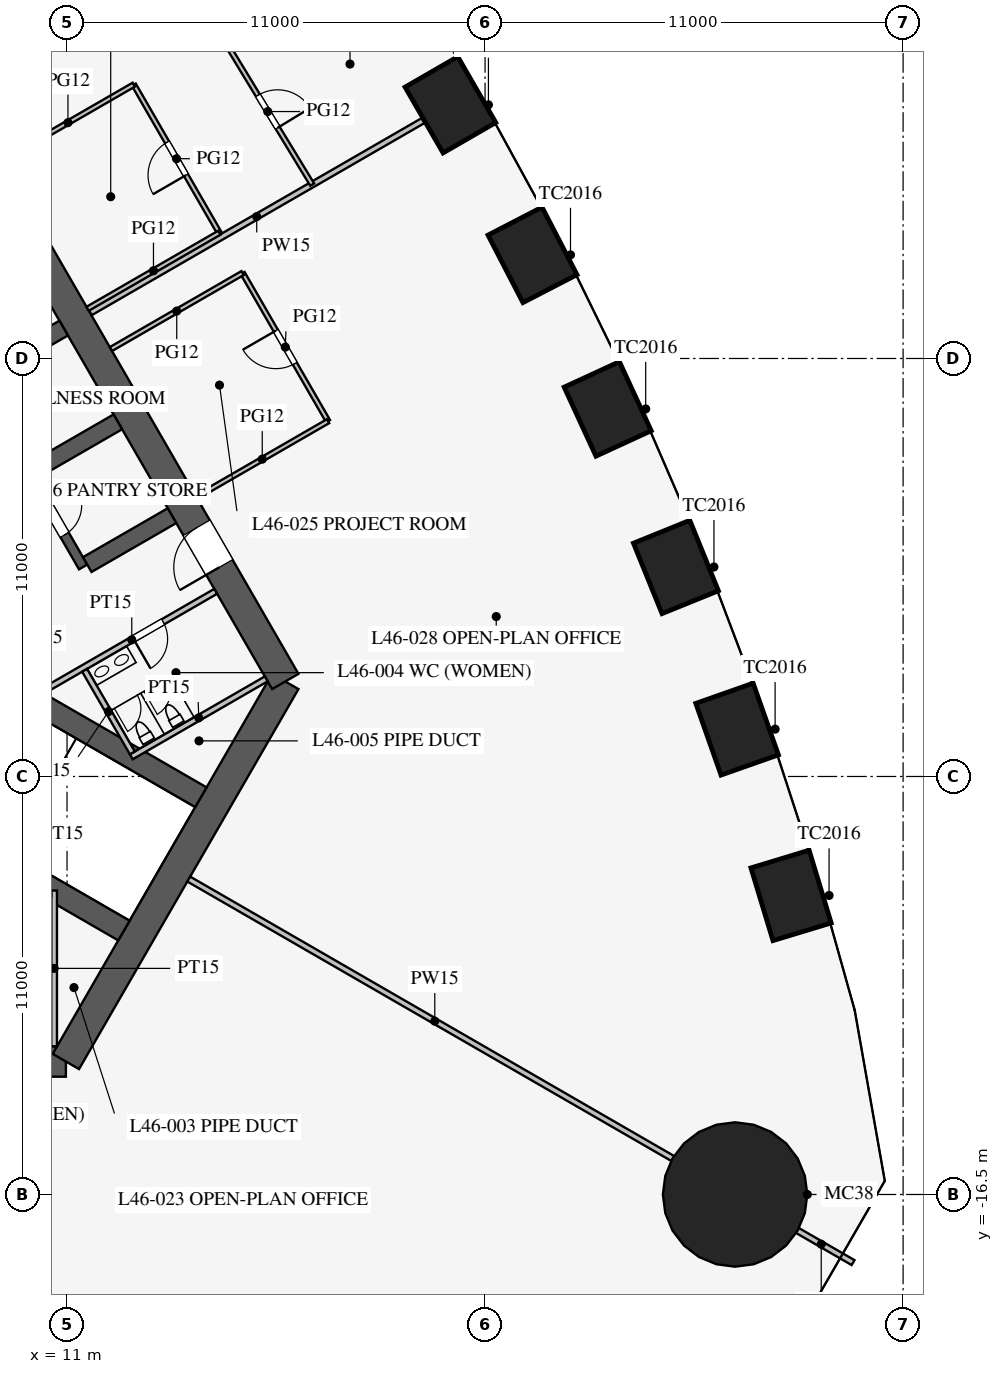
"""IFC4 building model, lengths in metres.
Left out: names, types, materials, properties, quantities, classifications, styles, units other than length and angle.
Written with IfcOpenShell. Run it as: python <this file> out.ifc"""

import sys

from ifc_helpers import new_model, si_unit, direction, frame, frame_2d, origin, origin_2d, place, context, subcontext, project, spatial, rectangle, circle, extrude, element, fill, save


model = new_model("IFC4")
c1 = context("Model", 3, precision=1e-05, world=origin(), true_north=direction((0.0, 1.0)))
c2 = subcontext(c1, "Body", "Model", "MODEL_VIEW")
j1 = project(units=[si_unit("LENGTHUNIT", "METRE"), si_unit("PLANEANGLEUNIT", "RADIAN")], contexts=[c1])
p1 = place(None, origin())
s1 = spatial("IfcSite", under=j1, at=p1, CompositionType="ELEMENT")
p2 = place(p1, origin())
s2 = spatial("IfcBuilding", under=s1, at=p2, CompositionType="ELEMENT")
p3 = place(p2, frame((0.0, 0.0, 202.3)))
s3 = spatial("IfcBuildingStorey", under=s2, at=p3, CompositionType="ELEMENT", Elevation=202.3)
for number, where, z_axis, x_axis in (
    (1, (30.052, -8.63, 0.0), (0.0, 0.0, 1.0), (-0.29, 0.957, 0.0)),
    (2, (28.632, -4.254, 0.0), (0.0, 0.0, 1.0), (-0.332, 0.943, 0.0)),
    (3, (27.022, 0.013, 0.0), (0.0, 0.0, 1.0), (-0.376, 0.927, 0.0)),
    (4, (25.227, 4.172, 0.0), (0.0, 0.0, 1.0), (-0.418, 0.908, 0.0)),
    (5, (23.248, 8.226, 0.0), (0.0, 0.0, 1.0), (-0.46, 0.888, 0.0)),
    (6, (21.088, 12.175, 0.0), (0.0, 0.0, 1.0), (-0.5, 0.866, 0.0)),
):
    element("IfcColumn", number, at=place(p3, frame(where, z_axis=z_axis, x_axis=x_axis)), inside=s3, PredefinedType="COLUMN", context=c2, shape_type="SweptSolid", body=[
        extrude(rectangle(XDim=2.0, YDim=1.6, at=origin_2d()), origin(), (0.0, 0.0, 1.0), 4.2),
    ])
p4 = place(p3, frame((28.579, -16.5, 0.0), z_axis=(0.0, 0.0, 1.0), x_axis=(1.0, 0.0, 0.0)))
e7 = element("IfcColumn", 7, at=p4, inside=s3, PredefinedType="COLUMN", context=c2, shape_type="SweptSolid", body=[
    extrude(circle(Radius=1.9, at=origin_2d()), origin(), (0.0, 0.0, 1.0), 4.2),
])
p5 = place(p3, frame((-10.97, -13.0, 0.0), z_axis=(0.0, 0.0, 1.0), x_axis=(1.0, 0.0, 0.0)))
e8 = element("IfcWall", 8, at=p5, inside=s3, PredefinedType="SHEAR", context=c2, shape_type="SweptSolid", body=[
    extrude(rectangle(XDim=21.939, YDim=0.8, at=frame_2d((10.97, 0.0))), origin(), (0.0, 0.0, 1.0), 4.2),
])
p6 = place(p5, frame((17.27, 0.0, 0.0)))
e9 = element("IfcOpeningElement", 9, at=p6, cuts=e8, PredefinedType="OPENING", context=c2, shape_type="SweptSolid", body=[
    extrude(rectangle(XDim=1.2, YDim=2.1, at=frame_2d((0.6, 1.05))), frame((0.0, 0.41, 0.0), z_axis=(0.0, -1.0, 0.0), x_axis=(1.0, 0.0, 0.0)), (0.0, 0.0, 1.0), 0.82),
])
p7 = place(p5, frame((3.47, 0.0, 0.0)))
e10 = element("IfcOpeningElement", 10, at=p7, cuts=e8, PredefinedType="OPENING", context=c2, shape_type="SweptSolid", body=[
    extrude(rectangle(XDim=1.2, YDim=2.1, at=frame_2d((0.6, 1.05))), frame((0.0, 0.41, 0.0), z_axis=(0.0, -1.0, 0.0), x_axis=(1.0, 0.0, 0.0)), (0.0, 0.0, 1.0), 0.82),
])
p8 = place(p3, frame((10.97, -13.0, 0.0), z_axis=(0.0, 0.0, 1.0), x_axis=(0.499995765644, 0.866027848477, 0.0)))
e11 = element("IfcWall", 11, at=p8, inside=s3, PredefinedType="SHEAR", context=c2, shape_type="SweptSolid", body=[
    extrude(rectangle(XDim=11.547, YDim=0.8, at=frame_2d((5.773, 0.0))), origin(), (0.0, 0.0, 1.0), 4.2),
])
p9 = place(p3, frame((16.743, -3.0, 0.0), z_axis=(0.0, 0.0, 1.0), x_axis=(-0.500002442456, 0.866023993627, 0.0)))
e12 = element("IfcWall", 12, at=p9, inside=s3, PredefinedType="SHEAR", context=c2, shape_type="SweptSolid", body=[
    extrude(rectangle(XDim=21.939, YDim=0.8, at=frame_2d((10.97, 0.0))), origin(), (0.0, 0.0, 1.0), 4.2),
])
p10 = place(p9, frame((17.27, 0.0, 0.0)))
e13 = element("IfcOpeningElement", 13, at=p10, cuts=e12, PredefinedType="OPENING", context=c2, shape_type="SweptSolid", body=[
    extrude(rectangle(XDim=1.2, YDim=2.1, at=frame_2d((0.6, 1.05))), frame((0.0, 0.41, 0.0), z_axis=(0.0, -1.0, 0.0), x_axis=(1.0, 0.0, 0.0)), (0.0, 0.0, 1.0), 0.82),
])
p11 = place(p9, frame((3.47, 0.0, 0.0)))
e14 = element("IfcOpeningElement", 14, at=p11, cuts=e12, PredefinedType="OPENING", context=c2, shape_type="SweptSolid", body=[
    extrude(rectangle(XDim=1.2, YDim=2.1, at=frame_2d((0.6, 1.05))), frame((0.0, 0.41, 0.0), z_axis=(0.0, -1.0, 0.0), x_axis=(1.0, 0.0, 0.0)), (0.0, 0.0, 1.0), 0.82),
])
p12 = place(p3, frame((11.424, 0.014, 0.0), z_axis=(0.0, 0.0, 1.0), x_axis=(-0.500001763848, 0.866024385424, 0.0)))
e15 = element("IfcWall", 15, at=p12, inside=s3, PredefinedType="SHEAR", context=c2, shape_type="SweptSolid", body=[
    extrude(rectangle(XDim=11.4, YDim=0.25, at=frame_2d((5.7, 0.0))), origin(), (0.0, 0.0, 1.0), 4.2),
])
p13 = place(p12, frame((0.975, 0.0, 0.0)))
e16 = element("IfcOpeningElement", 16, at=p13, cuts=e15, PredefinedType="OPENING", context=c2, shape_type="SweptSolid", body=[
    extrude(rectangle(XDim=0.9, YDim=2.1, at=frame_2d((0.45, 1.05))), frame((0.0, 0.135, 0.0), z_axis=(0.0, -1.0, 0.0), x_axis=(1.0, 0.0, 0.0)), (0.0, 0.0, 1.0), 0.27),
])
p14 = place(p12, frame((3.825, 0.0, 0.0)))
e17 = element("IfcOpeningElement", 17, at=p14, cuts=e15, PredefinedType="OPENING", context=c2, shape_type="SweptSolid", body=[
    extrude(rectangle(XDim=0.9, YDim=2.1, at=frame_2d((0.45, 1.05))), frame((0.0, 0.135, 0.0), z_axis=(0.0, -1.0, 0.0), x_axis=(1.0, 0.0, 0.0)), (0.0, 0.0, 1.0), 0.27),
])
p15 = place(p12, frame((6.675, 0.0, 0.0)))
e18 = element("IfcOpeningElement", 18, at=p15, cuts=e15, PredefinedType="OPENING", context=c2, shape_type="SweptSolid", body=[
    extrude(rectangle(XDim=0.9, YDim=2.1, at=frame_2d((0.45, 1.05))), frame((0.0, 0.135, 0.0), z_axis=(0.0, -1.0, 0.0), x_axis=(1.0, 0.0, 0.0)), (0.0, 0.0, 1.0), 0.27),
])
p16 = place(p12, frame((9.525, 0.0, 0.0)))
e19 = element("IfcOpeningElement", 19, at=p16, cuts=e15, PredefinedType="OPENING", context=c2, shape_type="SweptSolid", body=[
    extrude(rectangle(XDim=0.9, YDim=2.1, at=frame_2d((0.45, 1.05))), frame((0.0, 0.135, 0.0), z_axis=(0.0, -1.0, 0.0), x_axis=(1.0, 0.0, 0.0)), (0.0, 0.0, 1.0), 0.27),
])
for number, where, z_axis, x_axis in (
    (20, (11.532, 0.076, 0.0), (0.0, 0.0, 1.0), (0.866, 0.5, 0.0)),
    (21, (10.107, 2.544, 0.0), (0.0, 0.0, 1.0), (0.866, 0.5, 0.0)),
    (22, (8.682, 5.012, 0.0), (0.0, 0.0, 1.0), (0.866, 0.5, 0.0)),
):
    element("IfcWall", number, at=place(p3, frame(where, z_axis=z_axis, x_axis=x_axis)), inside=s3, PredefinedType="SHEAR", context=c2, shape_type="SweptSolid", body=[
        extrude(rectangle(XDim=2.575, YDim=0.45, at=frame_2d((1.288, 0.0))), origin(), (0.0, 0.0, 1.0), 4.2),
    ])
for number, where, z_axis, x_axis in (
    (23, (4.638, -5.016, 0.0), (0.0, 0.0, 1.0), (0.866, -0.5, 0.0)),
    (24, (6.663, -1.509, 0.0), (0.0, 0.0, 1.0), (0.866, -0.5, 0.0)),
):
    element("IfcWall", number, at=place(p3, frame(where, z_axis=z_axis, x_axis=x_axis)), inside=s3, PredefinedType="SHEAR", context=c2, shape_type="SweptSolid", body=[
        extrude(rectangle(XDim=9.075, YDim=0.6, at=frame_2d((4.538, 0.0))), origin(), (0.0, 0.0, 1.0), 4.2),
    ])
p17 = place(p3, frame((10.495, -3.178, 0.0), z_axis=(0.0, 0.0, 1.0), x_axis=(0.86602216432, 0.500005610874, 0.0)))
e25 = element("IfcWall", 25, at=p17, inside=s3, PredefinedType="PARTITIONING", context=c2, shape_type="SweptSolid", body=[
    extrude(rectangle(XDim=5.1, YDim=0.15, at=frame_2d((2.55, 0.0))), origin(), (0.0, 0.0, 1.0), 4.0),
])
p18 = place(p17, frame((2.6, 0.0, 0.0)))
e26 = element("IfcOpeningElement", 26, at=p18, cuts=e25, PredefinedType="OPENING", context=c2, shape_type="SweptSolid", body=[
    extrude(rectangle(XDim=0.9, YDim=2.1, at=frame_2d((0.45, 1.05))), frame((0.0, 0.085, 0.0), z_axis=(0.0, -1.0, 0.0), x_axis=(1.0, 0.0, 0.0)), (0.0, 0.0, 1.0), 0.17),
])
for number, where, z_axis, x_axis in (
    (27, (10.66, -8.5, 0.0), (0.0, 0.0, 1.0), (0.0, -1.0, 0.0)),
    (28, (12.691, -4.982, 0.0), (0.0, 0.0, 1.0), (0.866, 0.5, 0.0)),
):
    element("IfcWall", number, at=place(p3, frame(where, z_axis=z_axis, x_axis=x_axis)), inside=s3, PredefinedType="PARTITIONING", context=c2, shape_type="SweptSolid", body=[
        extrude(rectangle(XDim=4.1, YDim=0.15, at=frame_2d((2.05, 0.0))), origin(), (0.0, 0.0, 1.0), 4.0),
    ])
p19 = place(p3, frame((11.464, -2.706, 0.0), z_axis=(0.0, 0.0, 1.0), x_axis=(0.50001992892, -0.866013897511, 0.0)))
e29 = element("IfcWall", 29, at=p19, inside=s3, PredefinedType="PARTITIONING", context=c2, shape_type="SweptSolid", body=[
    extrude(rectangle(XDim=2.51, YDim=0.15, at=frame_2d((1.255, 0.0))), origin(), (0.0, 0.0, 1.0), 4.0),
])
p20 = place(p3, frame((14.203, -8.2, 0.0), z_axis=(0.0, 0.0, 1.0), x_axis=(0.866021600284, -0.500006587798, 0.0)))
e30 = element("IfcWall", 30, at=p20, inside=s3, PredefinedType="PARTITIONING", context=c2, shape_type="SweptSolid", body=[
    extrude(rectangle(XDim=14.95, YDim=0.15, at=frame_2d((7.475, 0.0))), origin(), (0.0, 0.0, 1.0), 2.4),
])
p21 = place(p3, frame((30.008, -17.325, 0.0), z_axis=(0.0, 0.0, 1.0), x_axis=(0.866013246922, -0.500021055713, 0.0)))
e31 = element("IfcWall", 31, at=p21, inside=s3, PredefinedType="PARTITIONING", context=c2, shape_type="SweptSolid", body=[
    extrude(rectangle(XDim=1.935, YDim=0.15, at=frame_2d((0.967, 0.0))), origin(), (0.0, 0.0, 1.0), 2.4),
])
p22 = place(p3, frame((11.613, 6.705, 0.0), z_axis=(0.0, 0.0, 1.0), x_axis=(0.866032382055, 0.499987913086, 0.0)))
e32 = element("IfcWall", 32, at=p22, inside=s3, PredefinedType="PARTITIONING", context=c2, shape_type="SweptSolid", body=[
    extrude(rectangle(XDim=10.111, YDim=0.15, at=frame_2d((5.055, 0.0))), origin(), (0.0, 0.0, 1.0), 3.3),
])
p23 = place(p3, frame((15.006, 8.808, 0.0), z_axis=(0.0, 0.0, 1.0), x_axis=(-0.500013631625, 0.866017533419, 0.0)))
e33 = element("IfcWall", 33, at=p23, inside=s3, PredefinedType="PARTITIONING", context=c2, shape_type="SweptSolid", body=[
    extrude(rectangle(XDim=4.5, YDim=0.12, at=frame_2d((2.25, 0.0))), origin(), (0.0, 0.0, 1.0), 2.9),
])
p24 = place(p23, frame((1.75, 0.0, 0.15)))
e34 = element("IfcOpeningElement", 34, at=p24, cuts=e33, PredefinedType="OPENING", context=c2, shape_type="SweptSolid", body=[
    extrude(rectangle(XDim=1.0, YDim=2.1, at=frame_2d((0.5, 1.05))), frame((0.0, 0.07, 0.0), z_axis=(0.0, -1.0, 0.0), x_axis=(1.0, 0.0, 0.0)), (0.0, 0.0, 1.0), 0.14),
])
p25 = place(p3, frame((17.869, 3.85, 0.0), z_axis=(0.0, 0.0, 1.0), x_axis=(-0.500013631625, 0.866017533419, 0.0)))
e35 = element("IfcWall", 35, at=p25, inside=s3, PredefinedType="PARTITIONING", context=c2, shape_type="SweptSolid", body=[
    extrude(rectangle(XDim=4.5, YDim=0.12, at=frame_2d((2.25, 0.0))), origin(), (0.0, 0.0, 1.0), 2.9),
])
p26 = place(p25, frame((1.75, 0.0, 0.15)))
e36 = element("IfcOpeningElement", 36, at=p26, cuts=e35, PredefinedType="OPENING", context=c2, shape_type="SweptSolid", body=[
    extrude(rectangle(XDim=1.0, YDim=2.1, at=frame_2d((0.5, 1.05))), frame((0.0, 0.07, 0.0), z_axis=(0.0, -1.0, 0.0), x_axis=(1.0, 0.0, 0.0)), (0.0, 0.0, 1.0), 0.14),
])
for number, where, z_axis, x_axis in (
    (37, (11.542, 6.808, 0.0), (0.0, 0.0, 1.0), (0.866, 0.5, 0.0)),
    (38, (9.292, 10.705, 0.0), (0.0, 0.0, 1.0), (0.866, 0.5, 0.0)),
    (39, (12.155, 5.747, 0.0), (0.0, 0.0, 1.0), (0.866, 0.5, 0.0)),
    (40, (14.405, 1.85, 0.0), (0.0, 0.0, 1.0), (0.866, 0.5, 0.0)),
):
    element("IfcWall", number, at=place(p3, frame(where, z_axis=z_axis, x_axis=x_axis)), inside=s3, PredefinedType="PARTITIONING", context=c2, shape_type="SweptSolid", body=[
        extrude(rectangle(XDim=4.0, YDim=0.12, at=frame_2d((2.0, 0.0))), origin(), (0.0, 0.0, 1.0), 2.9),
    ])
p27 = place(p3, frame((17.451, 10.075, 0.0), z_axis=(0.0, 0.0, 1.0), x_axis=(-0.519790350351, 0.85429385558, 0.0)))
e41 = element("IfcWall", 41, at=p27, inside=s3, PredefinedType="PARTITIONING", context=c2, shape_type="SweptSolid", body=[
    extrude(rectangle(XDim=4.501, YDim=0.12, at=frame_2d((2.25, 0.0))), origin(), (0.0, 0.0, 1.0), 2.9),
])
p28 = place(p27, frame((1.75, 0.0, 0.15)))
e42 = element("IfcOpeningElement", 42, at=p28, cuts=e41, PredefinedType="OPENING", context=c2, shape_type="SweptSolid", body=[
    extrude(rectangle(XDim=1.0, YDim=2.1, at=frame_2d((0.5, 1.05))), frame((0.0, 0.07, 0.0), z_axis=(0.0, -1.0, 0.0), x_axis=(1.0, 0.0, 0.0)), (0.0, 0.0, 1.0), 0.14),
])
p29 = place(p18, frame((0.9, 0.0, 0.0), z_axis=(0.0, 0.0, 1.0), x_axis=(-1.0, 0.0, 0.0)))
e43 = element("IfcDoor", 43, at=p29, inside=s3, OperationType="SINGLE_SWING_RIGHT", PredefinedType="DOOR", context=c2, shape_type="SweptSolid", body=[
    extrude(rectangle(XDim=0.9, YDim=2.1, at=frame_2d((0.45, 1.05))), frame((0.0, 0.025, 0.0), z_axis=(0.0, -1.0, 0.0), x_axis=(1.0, 0.0, 0.0)), (0.0, 0.0, 1.0), 0.05),
])
fill(e26, e43)
p30 = place(p11, origin())
e44 = element("IfcDoor", 44, at=p30, inside=s3, OperationType="SINGLE_SWING_LEFT", PredefinedType="DOOR", context=c2, shape_type="SweptSolid", body=[
    extrude(rectangle(XDim=1.2, YDim=2.1, at=frame_2d((0.6, 1.05))), frame((0.0, 0.025, 0.0), z_axis=(0.0, -1.0, 0.0), x_axis=(1.0, 0.0, 0.0)), (0.0, 0.0, 1.0), 0.05),
])
fill(e14, e44)
p31 = place(p13, frame((0.9, 0.0, 0.0), z_axis=(0.0, 0.0, 1.0), x_axis=(-1.0, 0.0, 0.0)))
e45 = element("IfcDoor", 45, at=p31, inside=s3, OperationType="SINGLE_SWING_LEFT", PredefinedType="DOOR", context=c2, shape_type="SweptSolid", body=[
    extrude(rectangle(XDim=0.9, YDim=2.1, at=frame_2d((0.45, 1.05))), frame((0.0, 0.025, 0.0), z_axis=(0.0, -1.0, 0.0), x_axis=(1.0, 0.0, 0.0)), (0.0, 0.0, 1.0), 0.05),
])
fill(e16, e45)
p32 = place(p26, origin())
e46 = element("IfcDoor", 46, at=p32, inside=s3, OperationType="SINGLE_SWING_RIGHT", PredefinedType="DOOR", context=c2, shape_type="SweptSolid", body=[
    extrude(rectangle(XDim=1.0, YDim=2.1, at=frame_2d((0.5, 1.05))), frame((0.0, 0.025, 0.0), z_axis=(0.0, -1.0, 0.0), x_axis=(1.0, 0.0, 0.0)), (0.0, 0.0, 1.0), 0.05),
])
fill(e36, e46)
p33 = place(p24, origin())
e47 = element("IfcDoor", 47, at=p33, inside=s3, OperationType="SINGLE_SWING_LEFT", PredefinedType="DOOR", context=c2, shape_type="SweptSolid", body=[
    extrude(rectangle(XDim=1.0, YDim=2.1, at=frame_2d((0.5, 1.05))), frame((0.0, 0.025, 0.0), z_axis=(0.0, -1.0, 0.0), x_axis=(1.0, 0.0, 0.0)), (0.0, 0.0, 1.0), 0.05),
])
fill(e34, e47)
p34 = place(p28, frame((1.0, 0.0, 0.0), z_axis=(0.0, 0.0, 1.0), x_axis=(-1.0, 0.0, 0.0)))
e48 = element("IfcDoor", 48, at=p34, inside=s3, OperationType="SINGLE_SWING_RIGHT", PredefinedType="DOOR", context=c2, shape_type="SweptSolid", body=[
    extrude(rectangle(XDim=1.0, YDim=2.1, at=frame_2d((0.5, 1.05))), frame((0.0, 0.025, 0.0), z_axis=(0.0, -1.0, 0.0), x_axis=(1.0, 0.0, 0.0)), (0.0, 0.0, 1.0), 0.05),
])
fill(e42, e48)
save(model, sys.argv[1])
